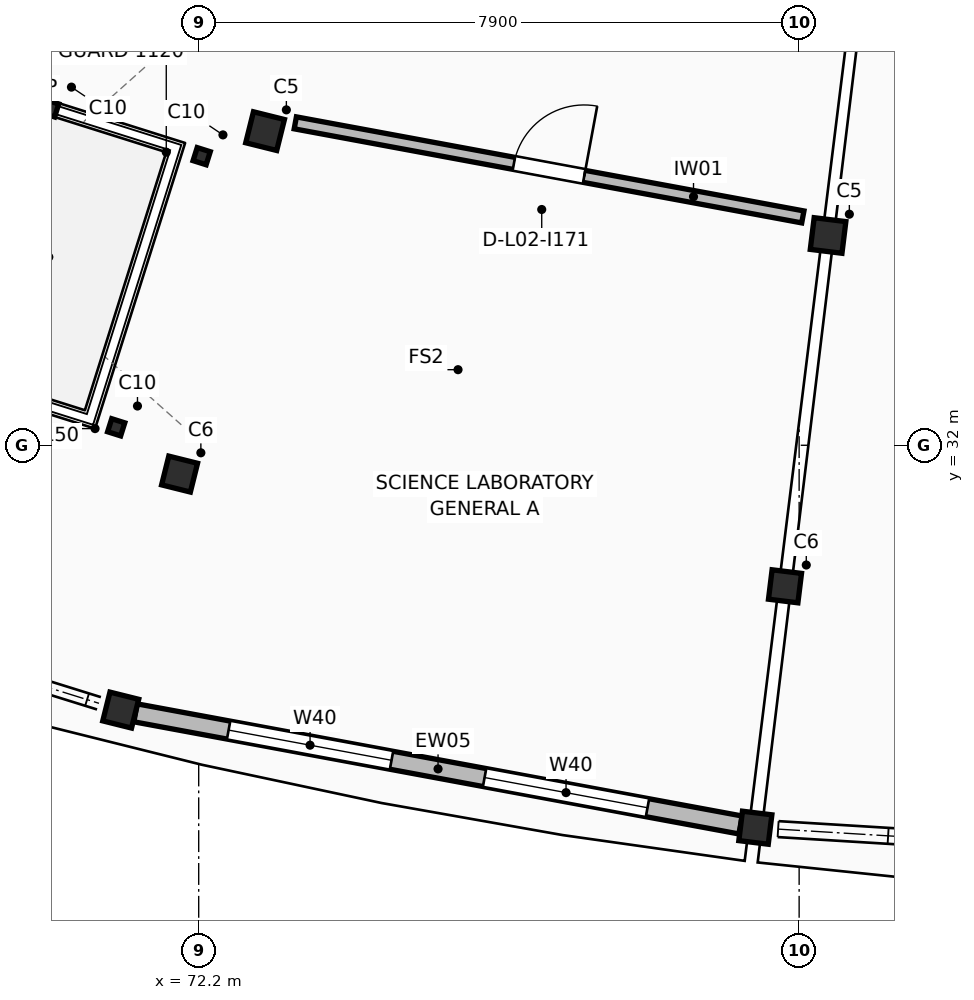
"""IFC4 building model, lengths in metres.
Left out: names, types, materials, properties, quantities, classifications, styles, units other than length and angle.
Written with IfcOpenShell. Run it as: python <this file> out.ifc"""

import sys

from ifc_helpers import new_model, si_unit, direction, frame, frame_2d, origin, origin_2d, place, context, subcontext, project, spatial, rectangle, hollow_rectangle, extrude, element, fill, save


model = new_model("IFC4")
c1 = context("Model", 3, precision=1e-05, world=origin(), true_north=direction((0.0, 1.0)))
c2 = subcontext(c1, "Body", "Model", "MODEL_VIEW")
j1 = project(units=[si_unit("LENGTHUNIT", "METRE"), si_unit("PLANEANGLEUNIT", "RADIAN")], contexts=[c1])
p1 = place(None, origin())
s1 = spatial("IfcSite", under=j1, at=p1, CompositionType="ELEMENT")
p2 = place(p1, origin())
s2 = spatial("IfcBuilding", under=s1, at=p2, CompositionType="ELEMENT")
p3 = place(p2, frame((0.0, 0.0, 8.16)))
s3 = spatial("IfcBuildingStorey", under=s2, at=p3, CompositionType="ELEMENT", Elevation=8.16)
p4 = place(p3, frame((73.073, 36.133, 0.0), z_axis=(0.0, 0.0, 1.0), x_axis=(-0.2419218956, -0.970295726276, 0.0)))
e1 = element("IfcColumn", 1, at=p4, inside=s3, PredefinedType="COLUMN", context=c2, shape_type="SweptSolid", body=[
    extrude(rectangle(XDim=0.42, YDim=0.42, at=origin_2d()), origin(), (0.0, 0.0, 1.0), 3.74),
])
for number, where, z_axis, x_axis in (
    (2, (71.948, 31.621, 0.0), (0.0, 0.0, 1.0), (-0.242, -0.97, 0.0)),
    (3, (71.174, 28.516, 0.0), (0.0, 0.0, 1.0), (-0.242, -0.97, 0.0)),
):
    element("IfcColumn", number, at=place(p3, frame(where, z_axis=z_axis, x_axis=x_axis)), inside=s3, PredefinedType="COLUMN", context=c2, shape_type="SweptSolid", body=[
        extrude(rectangle(XDim=0.39, YDim=0.39, at=origin_2d()), origin(), (0.0, 0.0, 1.0), 3.74),
    ])
p5 = place(p3, frame((80.481, 34.76, 0.0), z_axis=(0.0, 0.0, 1.0), x_axis=(-0.121869343405, -0.992546151641, 0.0)))
e4 = element("IfcColumn", 4, at=p5, inside=s3, PredefinedType="COLUMN", context=c2, shape_type="SweptSolid", body=[
    extrude(rectangle(XDim=0.42, YDim=0.42, at=origin_2d()), origin(), (0.0, 0.0, 1.0), 3.74),
])
for number, where, z_axis, x_axis in (
    (5, (79.914, 30.145, 0.0), (0.0, 0.0, 1.0), (-0.122, -0.993, 0.0)),
    (6, (79.524, 26.969, 0.0), (0.0, 0.0, 1.0), (-0.122, -0.993, 0.0)),
):
    element("IfcColumn", number, at=place(p3, frame(where, z_axis=z_axis, x_axis=x_axis)), inside=s3, PredefinedType="COLUMN", context=c2, shape_type="SweptSolid", body=[
        extrude(rectangle(XDim=0.39, YDim=0.39, at=origin_2d()), origin(), (0.0, 0.0, 1.0), 3.74),
    ])
p6 = place(p3, frame((71.369, 28.48, 0.0), z_axis=(0.0, 0.0, 1.0), x_axis=(0.983254797115, -0.182236121422, 0.0)))
e7 = element("IfcWall", 7, at=p6, inside=s3, PredefinedType="STANDARD", context=c2, shape_type="SweptSolid", body=[
    extrude(rectangle(XDim=8.096, YDim=0.24, at=frame_2d((4.048, 0.0))), origin(), (0.0, 0.0, 1.0), 2.78),
])
p7 = place(p6, frame((1.245, 0.0, 0.95)))
e8 = element("IfcOpeningElement", 8, at=p7, cuts=e7, PredefinedType="OPENING", context=c2, shape_type="SweptSolid", body=[
    extrude(rectangle(XDim=2.18, YDim=1.6, at=frame_2d((1.09, 0.8))), frame((0.0, 0.13, 0.0), z_axis=(0.0, -1.0, 0.0), x_axis=(1.0, 0.0, 0.0)), (0.0, 0.0, 1.0), 0.26),
])
p8 = place(p6, frame((4.671, 0.0, 0.95)))
e9 = element("IfcOpeningElement", 9, at=p8, cuts=e7, PredefinedType="OPENING", context=c2, shape_type="SweptSolid", body=[
    extrude(rectangle(XDim=2.18, YDim=1.6, at=frame_2d((1.09, 0.8))), frame((0.0, 0.13, 0.0), z_axis=(0.0, -1.0, 0.0), x_axis=(1.0, 0.0, 0.0)), (0.0, 0.0, 1.0), 0.26),
])
for number, where, z_axis, x_axis in (
    (10, (70.246, 36.432, 0.0), (0.0, 0.0, 1.0), (0.954, -0.301, 0.0)),
    (11, (71.115, 32.236, 0.0), (0.0, 0.0, 1.0), (0.954, -0.301, 0.0)),
    (12, (72.239, 35.803, 0.0), (0.0, 0.0, 1.0), (0.954, -0.301, 0.0)),
):
    element("IfcColumn", number, at=place(p3, frame(where, z_axis=z_axis, x_axis=x_axis)), inside=s3, PredefinedType="COLUMN", context=c2, shape_type="SweptSolid", body=[
        extrude(hollow_rectangle(XDim=0.18, YDim=0.18, WallThickness=0.01, InnerFilletRadius=0.01, OuterFilletRadius=0.02, at=origin_2d()), origin(), (0.0, 0.0, 1.0), 3.74),
    ])
p9 = place(p3, frame((73.471, 36.242, 0.0), z_axis=(0.0, 0.0, 1.0), x_axis=(0.983257442509, -0.182221847619, 0.0)))
e13 = element("IfcWall", 13, at=p9, inside=s3, PredefinedType="STANDARD", context=c2, shape_type="SweptSolid", body=[
    extrude(rectangle(XDim=6.792, YDim=0.16, at=frame_2d((3.396, 0.0))), origin(), (0.0, 0.0, 1.0), 2.75),
])
p10 = place(p9, frame((2.926, 0.0, 0.0)))
e14 = element("IfcOpeningElement", 14, at=p10, cuts=e13, PredefinedType="OPENING", context=c2, shape_type="SweptSolid", body=[
    extrude(rectangle(XDim=0.94, YDim=2.24, at=frame_2d((0.47, 1.12))), frame((0.0, 0.09, 0.0), z_axis=(0.0, -1.0, 0.0), x_axis=(1.0, 0.0, 0.0)), (0.0, 0.0, 1.0), 0.18),
])
p11 = place(p7, origin())
e15 = element("IfcWindow", 15, at=p11, inside=s3, PartitioningType="SINGLE_PANEL", PredefinedType="WINDOW", context=c2, shape_type="SweptSolid", body=[
    extrude(rectangle(XDim=2.18, YDim=1.6, at=frame_2d((1.09, 0.8))), frame((0.0, 0.03, 0.0), z_axis=(0.0, -1.0, 0.0), x_axis=(1.0, 0.0, 0.0)), (0.0, 0.0, 1.0), 0.06),
])
fill(e8, e15)
p12 = place(p8, origin())
e16 = element("IfcWindow", 16, at=p12, inside=s3, PartitioningType="SINGLE_PANEL", PredefinedType="WINDOW", context=c2, shape_type="SweptSolid", body=[
    extrude(rectangle(XDim=2.18, YDim=1.6, at=frame_2d((1.09, 0.8))), frame((0.0, 0.03, 0.0), z_axis=(0.0, -1.0, 0.0), x_axis=(1.0, 0.0, 0.0)), (0.0, 0.0, 1.0), 0.06),
])
fill(e9, e16)
p13 = place(p10, origin())
e17 = element("IfcDoor", 17, at=p13, inside=s3, OperationType="SINGLE_SWING_RIGHT", PredefinedType="DOOR", context=c2, shape_type="SweptSolid", body=[
    extrude(rectangle(XDim=0.94, YDim=2.24, at=frame_2d((0.47, 1.12))), frame((0.0, 0.025, 0.0), z_axis=(0.0, -1.0, 0.0), x_axis=(1.0, 0.0, 0.0)), (0.0, 0.0, 1.0), 0.05),
])
fill(e14, e17)
save(model, sys.argv[1])
